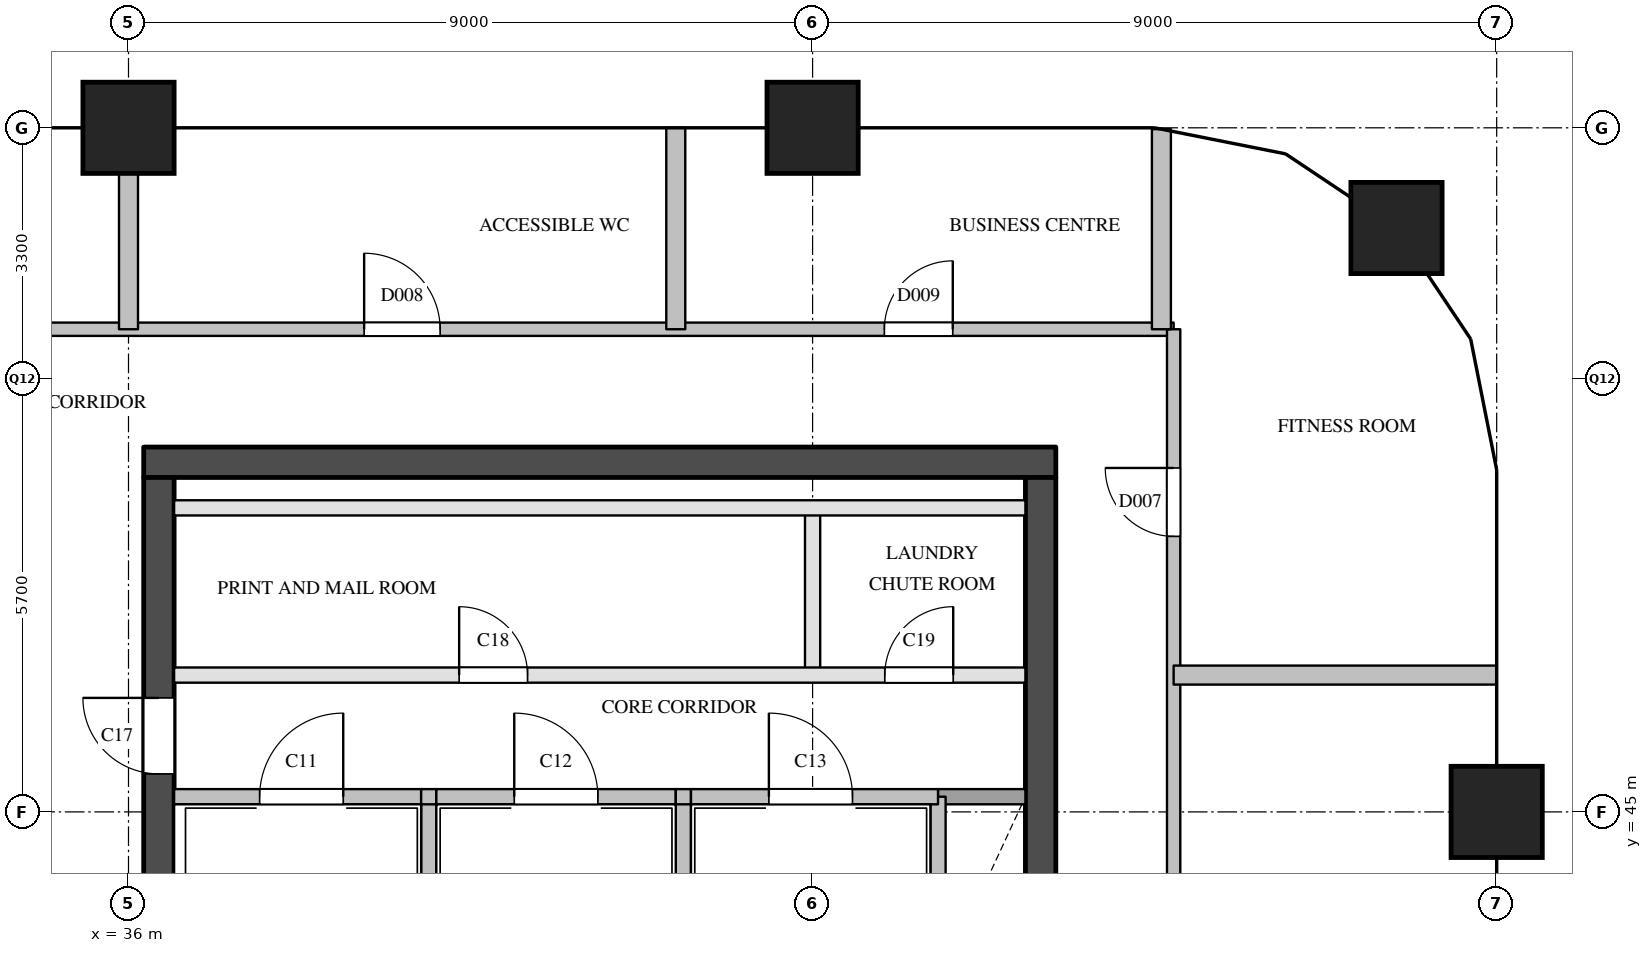
"""IFC4 building model, lengths in metres.
Left out: names, types, materials, properties, quantities, classifications, styles, units other than length and angle.
Written with IfcOpenShell. Run it as: python <this file> out.ifc"""

import sys

from ifc_helpers import new_model, si_unit, direction, frame, frame_2d, origin, origin_2d, place, context, subcontext, project, spatial, rectangle, extrude, element, fill, save


model = new_model("IFC4")
c1 = context("Model", 3, precision=1e-05, world=origin(), true_north=direction((0.0, 1.0)))
c2 = subcontext(c1, "Body", "Model", "MODEL_VIEW")
j1 = project(units=[si_unit("LENGTHUNIT", "METRE"), si_unit("PLANEANGLEUNIT", "RADIAN")], contexts=[c1])
p1 = place(None, origin())
s1 = spatial("IfcSite", under=j1, at=p1, CompositionType="ELEMENT")
p2 = place(p1, origin())
s2 = spatial("IfcBuilding", under=s1, at=p2, CompositionType="ELEMENT")
p3 = place(p2, frame((0.0, 0.0, 285.2)))
s3 = spatial("IfcBuildingStorey", under=s2, at=p3, CompositionType="ELEMENT", Elevation=285.2)
for number, where, z_axis, x_axis in (
    (1, (36.0, 54.0, 0.0), (0.0, 0.0, 1.0), (1.0, 0.0, 0.0)),
    (2, (45.0, 54.0, 0.0), (0.0, 0.0, 1.0), (1.0, 0.0, 0.0)),
    (3, (54.0, 45.0, 0.0), (0.0, 0.0, 1.0), (1.0, 0.0, 0.0)),
    (4, (52.682, 52.682, 0.0), (0.0, 0.0, 1.0), (1.0, 0.0, 0.0)),
):
    element("IfcColumn", number, at=place(p3, frame(where, z_axis=z_axis, x_axis=x_axis)), inside=s3, PredefinedType="COLUMN", context=c2, shape_type="SweptSolid", body=[
        extrude(rectangle(XDim=1.2, YDim=1.2, at=origin_2d()), origin(), (0.0, 0.0, 1.0), 5.0),
    ])
p4 = place(p3, frame((36.2, 49.6, 0.0), z_axis=(0.0, 0.0, 1.0), x_axis=(1.0, 0.0, 0.0)))
e5 = element("IfcWall", 5, at=p4, inside=s3, PredefinedType="SHEAR", context=c2, shape_type="SweptSolid", body=[
    extrude(rectangle(XDim=12.0, YDim=0.4, at=frame_2d((6.0, 0.0))), origin(), (0.0, 0.0, 1.0), 4.7),
])
p5 = place(p3, frame((36.4, 29.1, 0.0), z_axis=(0.0, 0.0, 1.0), x_axis=(0.0, 1.0, 0.0)))
e6 = element("IfcWall", 6, at=p5, inside=s3, PredefinedType="SHEAR", context=c2, shape_type="SweptSolid", body=[
    extrude(rectangle(XDim=20.3, YDim=0.4, at=frame_2d((10.15, 0.0))), origin(), (0.0, 0.0, 1.0), 4.7),
])
p6 = place(p5, frame((3.6, 0.0, 0.0)))
e7 = element("IfcOpeningElement", 7, at=p6, cuts=e6, PredefinedType="OPENING", context=c2, shape_type="SweptSolid", body=[
    extrude(rectangle(XDim=1.8, YDim=2.1, at=frame_2d((0.9, 1.05))), frame((0.0, 0.21, 0.0), z_axis=(0.0, -1.0, 0.0), x_axis=(1.0, 0.0, 0.0)), (0.0, 0.0, 1.0), 0.42),
])
p7 = place(p5, frame((16.4, 0.0, 0.0)))
e8 = element("IfcOpeningElement", 8, at=p7, cuts=e6, PredefinedType="OPENING", context=c2, shape_type="SweptSolid", body=[
    extrude(rectangle(XDim=1.0, YDim=2.1, at=frame_2d((0.5, 1.05))), frame((0.0, 0.21, 0.0), z_axis=(0.0, -1.0, 0.0), x_axis=(1.0, 0.0, 0.0)), (0.0, 0.0, 1.0), 0.42),
])
p8 = place(p3, frame((48.0, 29.1, 0.0), z_axis=(0.0, 0.0, 1.0), x_axis=(0.0, 1.0, 0.0)))
e9 = element("IfcWall", 9, at=p8, inside=s3, PredefinedType="SHEAR", context=c2, shape_type="SweptSolid", body=[
    extrude(rectangle(XDim=20.3, YDim=0.4, at=frame_2d((10.15, 0.0))), origin(), (0.0, 0.0, 1.0), 4.7),
])
p9 = place(p8, frame((12.5, 0.0, 0.0)))
e10 = element("IfcOpeningElement", 10, at=p9, cuts=e9, PredefinedType="OPENING", context=c2, shape_type="SweptSolid", body=[
    extrude(rectangle(XDim=0.7, YDim=2.1, at=frame_2d((0.35, 1.05))), frame((0.0, 0.21, 0.0), z_axis=(0.0, -1.0, 0.0), x_axis=(1.0, 0.0, 0.0)), (0.0, 0.0, 1.0), 0.42),
])
p10 = place(p8, frame((3.9, 0.0, 0.0)))
e11 = element("IfcOpeningElement", 11, at=p10, cuts=e9, PredefinedType="OPENING", context=c2, shape_type="SweptSolid", body=[
    extrude(rectangle(XDim=1.8, YDim=2.1, at=frame_2d((0.9, 1.05))), frame((0.0, 0.21, 0.0), z_axis=(0.0, -1.0, 0.0), x_axis=(1.0, 0.0, 0.0)), (0.0, 0.0, 1.0), 0.42),
])
for number, where, z_axis, x_axis in (
    (12, (39.95, 43.58, 0.0), (0.0, 0.0, 1.0), (0.0, 1.0, 0.0)),
    (13, (43.3, 43.58, 0.0), (0.0, 0.0, 1.0), (0.0, 1.0, 0.0)),
):
    element("IfcWall", number, at=place(p3, frame(where, z_axis=z_axis, x_axis=x_axis)), inside=s3, PredefinedType="SOLIDWALL", context=c2, shape_type="SweptSolid", body=[
        extrude(rectangle(XDim=1.62, YDim=0.2, at=frame_2d((0.81, 0.0))), origin(), (0.0, 0.0, 1.0), 4.7),
    ])
p11 = place(p3, frame((45.0, 46.8, 0.0), z_axis=(0.0, 0.0, 1.0), x_axis=(0.0, 1.0, 0.0)))
e14 = element("IfcWall", 14, at=p11, inside=s3, PredefinedType="PARTITIONING", context=c2, shape_type="SweptSolid", body=[
    extrude(rectangle(XDim=2.2, YDim=0.2, at=frame_2d((1.1, 0.0))), origin(), (0.0, 0.0, 1.0), 4.7),
])
p12 = place(p3, frame((46.65, 43.58, 0.0), z_axis=(0.0, 0.0, 1.0), x_axis=(0.0, 1.0, 0.0)))
e15 = element("IfcWall", 15, at=p12, inside=s3, PredefinedType="SOLIDWALL", context=c2, shape_type="SweptSolid", body=[
    extrude(rectangle(XDim=1.62, YDim=0.2, at=frame_2d((0.81, 0.0))), origin(), (0.0, 0.0, 1.0), 4.7),
])
p13 = place(p3, frame((46.65, 45.2, 0.0), z_axis=(0.0, 0.0, 1.0), x_axis=(1.0, 0.0, 0.0)))
e16 = element("IfcWall", 16, at=p13, inside=s3, PredefinedType="SOLIDWALL", context=c2, shape_type="SweptSolid", body=[
    extrude(rectangle(XDim=1.15, YDim=0.2, at=frame_2d((0.575, 0.0))), origin(), (0.0, 0.0, 1.0), 4.7),
])
p14 = place(p3, frame((36.6, 45.2, 0.0), z_axis=(0.0, 0.0, 1.0), x_axis=(1.0, 0.0, 0.0)))
e17 = element("IfcWall", 17, at=p14, inside=s3, PredefinedType="SOLIDWALL", context=c2, shape_type="SweptSolid", body=[
    extrude(rectangle(XDim=3.25, YDim=0.2, at=frame_2d((1.625, 0.0))), origin(), (0.0, 0.0, 1.0), 4.7),
])
p15 = place(p14, frame((1.125, 0.0, 0.0)))
e18 = element("IfcOpeningElement", 18, at=p15, cuts=e17, PredefinedType="OPENING", context=c2, shape_type="SweptSolid", body=[
    extrude(rectangle(XDim=1.1, YDim=2.1, at=frame_2d((0.55, 1.05))), frame((0.0, 0.11, 0.0), z_axis=(0.0, -1.0, 0.0), x_axis=(1.0, 0.0, 0.0)), (0.0, 0.0, 1.0), 0.22),
])
p16 = place(p3, frame((39.85, 45.2, 0.0), z_axis=(0.0, 0.0, 1.0), x_axis=(1.0, 0.0, 0.0)))
e19 = element("IfcWall", 19, at=p16, inside=s3, PredefinedType="SOLIDWALL", context=c2, shape_type="SweptSolid", body=[
    extrude(rectangle(XDim=0.2, YDim=0.2, at=frame_2d((0.1, 0.0))), origin(), (0.0, 0.0, 1.0), 4.7),
])
p17 = place(p3, frame((40.05, 45.2, 0.0), z_axis=(0.0, 0.0, 1.0), x_axis=(1.0, 0.0, 0.0)))
e20 = element("IfcWall", 20, at=p17, inside=s3, PredefinedType="SOLIDWALL", context=c2, shape_type="SweptSolid", body=[
    extrude(rectangle(XDim=3.15, YDim=0.2, at=frame_2d((1.575, 0.0))), origin(), (0.0, 0.0, 1.0), 4.7),
])
p18 = place(p17, frame((1.025, 0.0, 0.0)))
e21 = element("IfcOpeningElement", 21, at=p18, cuts=e20, PredefinedType="OPENING", context=c2, shape_type="SweptSolid", body=[
    extrude(rectangle(XDim=1.1, YDim=2.1, at=frame_2d((0.55, 1.05))), frame((0.0, 0.11, 0.0), z_axis=(0.0, -1.0, 0.0), x_axis=(1.0, 0.0, 0.0)), (0.0, 0.0, 1.0), 0.22),
])
p19 = place(p3, frame((43.2, 45.2, 0.0), z_axis=(0.0, 0.0, 1.0), x_axis=(1.0, 0.0, 0.0)))
e22 = element("IfcWall", 22, at=p19, inside=s3, PredefinedType="SOLIDWALL", context=c2, shape_type="SweptSolid", body=[
    extrude(rectangle(XDim=0.2, YDim=0.2, at=frame_2d((0.1, 0.0))), origin(), (0.0, 0.0, 1.0), 4.7),
])
p20 = place(p3, frame((43.4, 45.2, 0.0), z_axis=(0.0, 0.0, 1.0), x_axis=(1.0, 0.0, 0.0)))
e23 = element("IfcWall", 23, at=p20, inside=s3, PredefinedType="SOLIDWALL", context=c2, shape_type="SweptSolid", body=[
    extrude(rectangle(XDim=3.25, YDim=0.2, at=frame_2d((1.625, 0.0))), origin(), (0.0, 0.0, 1.0), 4.7),
])
p21 = place(p20, frame((1.025, 0.0, 0.0)))
e24 = element("IfcOpeningElement", 24, at=p21, cuts=e23, PredefinedType="OPENING", context=c2, shape_type="SweptSolid", body=[
    extrude(rectangle(XDim=1.1, YDim=2.1, at=frame_2d((0.55, 1.05))), frame((0.0, 0.11, 0.0), z_axis=(0.0, -1.0, 0.0), x_axis=(1.0, 0.0, 0.0)), (0.0, 0.0, 1.0), 0.22),
])
p22 = place(p3, frame((36.6, 46.8, 0.0), z_axis=(0.0, 0.0, 1.0), x_axis=(1.0, 0.0, 0.0)))
e25 = element("IfcWall", 25, at=p22, inside=s3, PredefinedType="PARTITIONING", context=c2, shape_type="SweptSolid", body=[
    extrude(rectangle(XDim=11.2, YDim=0.2, at=frame_2d((5.6, 0.0))), origin(), (0.0, 0.0, 1.0), 4.7),
])
p23 = place(p22, frame((3.75, 0.0, 0.0)))
e26 = element("IfcOpeningElement", 26, at=p23, cuts=e25, PredefinedType="OPENING", context=c2, shape_type="SweptSolid", body=[
    extrude(rectangle(XDim=0.9, YDim=2.1, at=frame_2d((0.45, 1.05))), frame((0.0, 0.11, 0.0), z_axis=(0.0, -1.0, 0.0), x_axis=(1.0, 0.0, 0.0)), (0.0, 0.0, 1.0), 0.22),
])
p24 = place(p22, frame((9.35, 0.0, 0.0)))
e27 = element("IfcOpeningElement", 27, at=p24, cuts=e25, PredefinedType="OPENING", context=c2, shape_type="SweptSolid", body=[
    extrude(rectangle(XDim=0.9, YDim=2.1, at=frame_2d((0.45, 1.05))), frame((0.0, 0.11, 0.0), z_axis=(0.0, -1.0, 0.0), x_axis=(1.0, 0.0, 0.0)), (0.0, 0.0, 1.0), 0.22),
])
p25 = place(p3, frame((36.6, 49.0, 0.0), z_axis=(0.0, 0.0, 1.0), x_axis=(1.0, 0.0, 0.0)))
e28 = element("IfcWall", 28, at=p25, inside=s3, PredefinedType="PARTITIONING", context=c2, shape_type="SweptSolid", body=[
    extrude(rectangle(XDim=11.2, YDim=0.2, at=frame_2d((5.6, 0.0))), origin(), (0.0, 0.0, 1.0), 4.7),
])
p26 = place(p3, frame((34.65, 51.35, 0.0), z_axis=(0.0, 0.0, 1.0), x_axis=(1.0, 0.0, 0.0)))
e29 = element("IfcWall", 29, at=p26, inside=s3, PredefinedType="PARTITIONING", context=c2, shape_type="SweptSolid", body=[
    extrude(rectangle(XDim=15.1, YDim=0.175, at=frame_2d((7.55, 0.0))), origin(), (0.0, 0.0, 1.0), 4.7),
])
p27 = place(p26, frame((4.45, 0.0, 0.0)))
e30 = element("IfcOpeningElement", 30, at=p27, cuts=e29, PredefinedType="OPENING", context=c2, shape_type="SweptSolid", body=[
    extrude(rectangle(XDim=1.0, YDim=2.1, at=frame_2d((0.5, 1.05))), frame((0.0, 0.097, 0.0), z_axis=(0.0, -1.0, 0.0), x_axis=(1.0, 0.0, 0.0)), (0.0, 0.0, 1.0), 0.195),
])
p28 = place(p26, frame((11.294, 0.0, 0.0)))
e31 = element("IfcOpeningElement", 31, at=p28, cuts=e29, PredefinedType="OPENING", context=c2, shape_type="SweptSolid", body=[
    extrude(rectangle(XDim=0.9, YDim=2.1, at=frame_2d((0.45, 1.05))), frame((0.0, 0.097, 0.0), z_axis=(0.0, -1.0, 0.0), x_axis=(1.0, 0.0, 0.0)), (0.0, 0.0, 1.0), 0.195),
])
p29 = place(p3, frame((49.75, 28.5, 0.0), z_axis=(0.0, 0.0, 1.0), x_axis=(0.0, 1.0, 0.0)))
e32 = element("IfcWall", 32, at=p29, inside=s3, PredefinedType="PARTITIONING", context=c2, shape_type="SweptSolid", body=[
    extrude(rectangle(XDim=22.85, YDim=0.175, at=frame_2d((11.425, 0.0))), origin(), (0.0, 0.0, 1.0), 4.7),
])
p30 = place(p29, frame((3.3, 0.0, 0.0)))
e33 = element("IfcOpeningElement", 33, at=p30, cuts=e32, PredefinedType="OPENING", context=c2, shape_type="SweptSolid", body=[
    extrude(rectangle(XDim=0.9, YDim=2.1, at=frame_2d((0.45, 1.05))), frame((0.0, 0.097, 0.0), z_axis=(0.0, -1.0, 0.0), x_axis=(1.0, 0.0, 0.0)), (0.0, 0.0, 1.0), 0.195),
])
p31 = place(p29, frame((12.45, 0.0, 0.0)))
e34 = element("IfcOpeningElement", 34, at=p31, cuts=e32, PredefinedType="OPENING", context=c2, shape_type="SweptSolid", body=[
    extrude(rectangle(XDim=0.9, YDim=2.1, at=frame_2d((0.45, 1.05))), frame((0.0, 0.097, 0.0), z_axis=(0.0, -1.0, 0.0), x_axis=(1.0, 0.0, 0.0)), (0.0, 0.0, 1.0), 0.195),
])
p32 = place(p29, frame((20.125, 0.0, 0.0)))
e35 = element("IfcOpeningElement", 35, at=p32, cuts=e32, PredefinedType="OPENING", context=c2, shape_type="SweptSolid", body=[
    extrude(rectangle(XDim=0.9, YDim=2.1, at=frame_2d((0.45, 1.05))), frame((0.0, 0.097, 0.0), z_axis=(0.0, -1.0, 0.0), x_axis=(1.0, 0.0, 0.0)), (0.0, 0.0, 1.0), 0.195),
])
p33 = place(p3, frame((49.75, 46.8, 0.0), z_axis=(0.0, 0.0, 1.0), x_axis=(1.0, 0.0, 0.0)))
e36 = element("IfcWall", 36, at=p33, inside=s3, PredefinedType="PARTITIONING", context=c2, shape_type="SweptSolid", body=[
    extrude(rectangle(XDim=4.25, YDim=0.25, at=frame_2d((2.125, 0.0))), origin(), (0.0, 0.0, 1.0), 3.7),
])
p34 = place(p3, frame((36.0, 51.35, 0.0), z_axis=(0.0, 0.0, 1.0), x_axis=(0.0, 1.0, 0.0)))
e37 = element("IfcWall", 37, at=p34, inside=s3, PredefinedType="PARTITIONING", context=c2, shape_type="SweptSolid", body=[
    extrude(rectangle(XDim=2.65, YDim=0.25, at=frame_2d((1.325, 0.0))), origin(), (0.0, 0.0, 1.0), 4.7),
])
p35 = place(p3, frame((43.2, 51.35, 0.0), z_axis=(0.0, 0.0, 1.0), x_axis=(0.0, 1.0, 0.0)))
e38 = element("IfcWall", 38, at=p35, inside=s3, PredefinedType="PARTITIONING", context=c2, shape_type="SweptSolid", body=[
    extrude(rectangle(XDim=2.65, YDim=0.25, at=frame_2d((1.325, 0.0))), origin(), (0.0, 0.0, 1.0), 3.7),
])
p36 = place(p3, frame((49.589, 51.35, 0.0), z_axis=(0.0, 0.0, 1.0), x_axis=(0.0, 1.0, 0.0)))
e39 = element("IfcWall", 39, at=p36, inside=s3, PredefinedType="PARTITIONING", context=c2, shape_type="SweptSolid", body=[
    extrude(rectangle(XDim=2.632, YDim=0.25, at=frame_2d((1.316, 0.0))), origin(), (0.0, 0.0, 1.0), 3.7),
])
p37 = place(p15, origin())
e40 = element("IfcDoor", 40, at=p37, inside=s3, OperationType="SINGLE_SWING_RIGHT", PredefinedType="DOOR", context=c2, shape_type="SweptSolid", body=[
    extrude(rectangle(XDim=1.1, YDim=2.1, at=frame_2d((0.55, 1.05))), frame((0.0, 0.025, 0.0), z_axis=(0.0, -1.0, 0.0), x_axis=(1.0, 0.0, 0.0)), (0.0, 0.0, 1.0), 0.05),
])
fill(e18, e40)
p38 = place(p18, origin())
e41 = element("IfcDoor", 41, at=p38, inside=s3, OperationType="SINGLE_SWING_LEFT", PredefinedType="DOOR", context=c2, shape_type="SweptSolid", body=[
    extrude(rectangle(XDim=1.1, YDim=2.1, at=frame_2d((0.55, 1.05))), frame((0.0, 0.025, 0.0), z_axis=(0.0, -1.0, 0.0), x_axis=(1.0, 0.0, 0.0)), (0.0, 0.0, 1.0), 0.05),
])
fill(e21, e41)
p39 = place(p21, origin())
e42 = element("IfcDoor", 42, at=p39, inside=s3, OperationType="SINGLE_SWING_LEFT", PredefinedType="DOOR", context=c2, shape_type="SweptSolid", body=[
    extrude(rectangle(XDim=1.1, YDim=2.1, at=frame_2d((0.55, 1.05))), frame((0.0, 0.025, 0.0), z_axis=(0.0, -1.0, 0.0), x_axis=(1.0, 0.0, 0.0)), (0.0, 0.0, 1.0), 0.05),
])
fill(e24, e42)
p40 = place(p7, origin())
e43 = element("IfcDoor", 43, at=p40, inside=s3, OperationType="SINGLE_SWING_RIGHT", PredefinedType="DOOR", context=c2, shape_type="SweptSolid", body=[
    extrude(rectangle(XDim=1.0, YDim=2.1, at=frame_2d((0.5, 1.05))), frame((0.0, 0.025, 0.0), z_axis=(0.0, -1.0, 0.0), x_axis=(1.0, 0.0, 0.0)), (0.0, 0.0, 1.0), 0.05),
])
fill(e8, e43)
p41 = place(p23, origin())
e44 = element("IfcDoor", 44, at=p41, inside=s3, OperationType="SINGLE_SWING_LEFT", PredefinedType="DOOR", context=c2, shape_type="SweptSolid", body=[
    extrude(rectangle(XDim=0.9, YDim=2.1, at=frame_2d((0.45, 1.05))), frame((0.0, 0.025, 0.0), z_axis=(0.0, -1.0, 0.0), x_axis=(1.0, 0.0, 0.0)), (0.0, 0.0, 1.0), 0.05),
])
fill(e26, e44)
p42 = place(p24, origin())
e45 = element("IfcDoor", 45, at=p42, inside=s3, OperationType="SINGLE_SWING_RIGHT", PredefinedType="DOOR", context=c2, shape_type="SweptSolid", body=[
    extrude(rectangle(XDim=0.9, YDim=2.1, at=frame_2d((0.45, 1.05))), frame((0.0, 0.025, 0.0), z_axis=(0.0, -1.0, 0.0), x_axis=(1.0, 0.0, 0.0)), (0.0, 0.0, 1.0), 0.05),
])
fill(e27, e45)
p43 = place(p32, origin())
e46 = element("IfcDoor", 46, at=p43, inside=s3, OperationType="SINGLE_SWING_RIGHT", PredefinedType="DOOR", context=c2, shape_type="SweptSolid", body=[
    extrude(rectangle(XDim=0.9, YDim=2.1, at=frame_2d((0.45, 1.05))), frame((0.0, 0.025, 0.0), z_axis=(0.0, -1.0, 0.0), x_axis=(1.0, 0.0, 0.0)), (0.0, 0.0, 1.0), 0.05),
])
fill(e35, e46)
p44 = place(p27, origin())
e47 = element("IfcDoor", 47, at=p44, inside=s3, OperationType="SINGLE_SWING_LEFT", PredefinedType="DOOR", context=c2, shape_type="SweptSolid", body=[
    extrude(rectangle(XDim=1.0, YDim=2.1, at=frame_2d((0.5, 1.05))), frame((0.0, 0.025, 0.0), z_axis=(0.0, -1.0, 0.0), x_axis=(1.0, 0.0, 0.0)), (0.0, 0.0, 1.0), 0.05),
])
fill(e30, e47)
p45 = place(p28, origin())
e48 = element("IfcDoor", 48, at=p45, inside=s3, OperationType="SINGLE_SWING_RIGHT", PredefinedType="DOOR", context=c2, shape_type="SweptSolid", body=[
    extrude(rectangle(XDim=0.9, YDim=2.1, at=frame_2d((0.45, 1.05))), frame((0.0, 0.025, 0.0), z_axis=(0.0, -1.0, 0.0), x_axis=(1.0, 0.0, 0.0)), (0.0, 0.0, 1.0), 0.05),
])
fill(e31, e48)
save(model, sys.argv[1])
